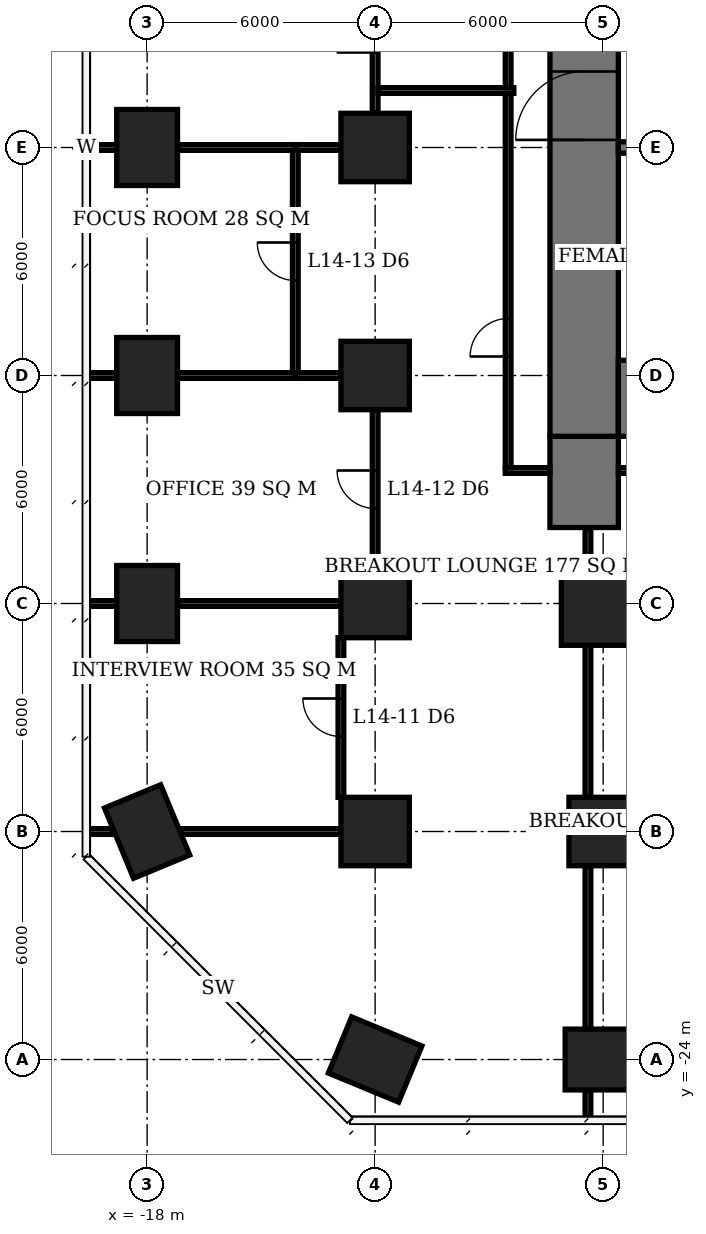
"""IFC4 building model, lengths in metres.
Left out: names, types, materials, properties, quantities, classifications, styles, units other than length and angle.
Written with IfcOpenShell. Run it as: python <this file> out.ifc"""

import sys

from ifc_helpers import new_model, si_unit, direction, frame, frame_2d, origin, origin_2d, place, context, subcontext, project, spatial, rectangle, extrude, element, fill, save


model = new_model("IFC4")
c1 = context("Model", 3, precision=1e-05, world=origin(), true_north=direction((0.0, 1.0)))
c2 = subcontext(c1, "Body", "Model", "MODEL_VIEW")
j1 = project(units=[si_unit("LENGTHUNIT", "METRE"), si_unit("PLANEANGLEUNIT", "RADIAN")], contexts=[c1])
p1 = place(None, origin())
s1 = spatial("IfcSite", under=j1, at=p1, CompositionType="ELEMENT")
p2 = place(p1, origin())
s2 = spatial("IfcBuilding", under=s1, at=p2, CompositionType="ELEMENT")
p3 = place(p2, frame((0.0, 0.0, 61.1)))
s3 = spatial("IfcBuildingStorey", under=s2, at=p3, CompositionType="ELEMENT", Elevation=61.1)
for number, where, z_axis, x_axis in (
    (1, (-18.0, -18.0, 0.0), (0.0, 0.0, 1.0), (-0.383, 0.924, 0.0)),
    (2, (-18.0, -12.0, 0.0), (0.0, 0.0, 1.0), (0.0, 1.0, 0.0)),
    (3, (-18.0, -6.0, 0.0), (0.0, 0.0, 1.0), (0.0, 1.0, 0.0)),
    (4, (-18.0, 0.0, 0.0), (0.0, 0.0, 1.0), (0.0, 1.0, 0.0)),
    (5, (-12.0, -24.0, 0.0), (0.0, 0.0, 1.0), (-0.924, 0.383, 0.0)),
):
    element("IfcColumn", number, at=place(p3, frame(where, z_axis=z_axis, x_axis=x_axis)), inside=s3, PredefinedType="COLUMN", context=c2, shape_type="SweptSolid", body=[
        extrude(rectangle(XDim=2.0, YDim=1.6, at=origin_2d()), origin(), (0.0, 0.0, 1.0), 3.9),
    ])
for number, where, z_axis, x_axis in (
    (6, (-12.0, -18.0, 0.0), (0.0, 0.0, 1.0), (1.0, 0.0, 0.0)),
    (7, (-12.0, -12.0, 0.0), (0.0, 0.0, 1.0), (1.0, 0.0, 0.0)),
    (8, (-12.0, -6.0, 0.0), (0.0, 0.0, 1.0), (1.0, 0.0, 0.0)),
    (9, (-12.0, 0.0, 0.0), (0.0, 0.0, 1.0), (1.0, 0.0, 0.0)),
):
    element("IfcColumn", number, at=place(p3, frame(where, z_axis=z_axis, x_axis=x_axis)), inside=s3, PredefinedType="COLUMN", context=c2, shape_type="SweptSolid", body=[
        extrude(rectangle(XDim=1.8, YDim=1.8, at=origin_2d()), origin(), (0.0, 0.0, 1.0), 3.9),
    ])
p4 = place(p3, frame((-6.0, -24.0, 0.0), z_axis=(0.0, 0.0, 1.0), x_axis=(1.0, 0.0, 0.0)))
e10 = element("IfcColumn", 10, at=p4, inside=s3, PredefinedType="COLUMN", context=c2, shape_type="SweptSolid", body=[
    extrude(rectangle(XDim=2.0, YDim=1.6, at=origin_2d()), origin(), (0.0, 0.0, 1.0), 3.9),
])
p5 = place(p3, frame((-6.0, -18.0, 0.0), z_axis=(0.0, 0.0, 1.0), x_axis=(1.0, 0.0, 0.0)))
e11 = element("IfcColumn", 11, at=p5, inside=s3, PredefinedType="COLUMN", context=c2, shape_type="SweptSolid", body=[
    extrude(rectangle(XDim=1.8, YDim=1.8, at=origin_2d()), origin(), (0.0, 0.0, 1.0), 3.9),
])
p6 = place(p3, frame((-6.0, -12.0, 0.0), z_axis=(0.0, 0.0, 1.0), x_axis=(1.0, 0.0, 0.0)))
e12 = element("IfcColumn", 12, at=p6, inside=s3, PredefinedType="COLUMN", context=c2, shape_type="SweptSolid", body=[
    extrude(rectangle(XDim=2.2, YDim=2.2, at=origin_2d()), origin(), (0.0, 0.0, 1.0), 3.9),
])
p7 = place(p3, frame((-5.6, -6.6, 0.0), z_axis=(0.0, 0.0, 1.0), x_axis=(1.0, 0.0, 0.0)))
e13 = element("IfcWall", 13, at=p7, inside=s3, PredefinedType="SHEAR", context=c2, shape_type="SweptSolid", body=[
    extrude(rectangle(XDim=23.2, YDim=2.0, at=frame_2d((11.6, 0.0))), origin(), (0.0, 0.0, 1.0), 3.9),
])
p8 = place(p3, frame((-6.5, -7.6, 0.0), z_axis=(0.0, 0.0, 1.0), x_axis=(0.0, 1.0, 0.0)))
e14 = element("IfcWall", 14, at=p8, inside=s3, PredefinedType="SHEAR", context=c2, shape_type="SweptSolid", body=[
    extrude(rectangle(XDim=21.2, YDim=1.8, at=frame_2d((10.6, 0.0))), origin(), (0.0, 0.0, 1.0), 3.9),
])
p9 = place(p8, frame((7.8, 0.0, 0.0)))
e15 = element("IfcOpeningElement", 15, at=p9, cuts=e14, PredefinedType="OPENING", context=c2, shape_type="SweptSolid", body=[
    extrude(rectangle(XDim=1.8, YDim=2.4, at=frame_2d((0.9, 1.2))), frame((0.0, 0.91, 0.0), z_axis=(0.0, -1.0, 0.0), x_axis=(1.0, 0.0, 0.0)), (0.0, 0.0, 1.0), 1.82),
])
p10 = place(p3, frame((-6.5, -10.0, 0.0), z_axis=(0.0, 0.0, 1.0), x_axis=(0.0, 1.0, 0.0)))
e16 = element("IfcWall", 16, at=p10, inside=s3, PredefinedType="SHEAR", context=c2, shape_type="SweptSolid", body=[
    extrude(rectangle(XDim=2.4, YDim=1.8, at=frame_2d((1.2, 0.0))), origin(), (0.0, 0.0, 1.0), 3.9),
])
p11 = place(p3, frame((-5.6, 0.0, 0.0), z_axis=(0.0, 0.0, 1.0), x_axis=(1.0, 0.0, 0.0)))
e17 = element("IfcWall", 17, at=p11, inside=s3, PredefinedType="SHEAR", context=c2, shape_type="SweptSolid", body=[
    extrude(rectangle(XDim=17.75, YDim=0.3, at=frame_2d((8.875, 0.0))), origin(), (0.0, 0.0, 1.0), 3.9),
])
p12 = place(p11, frame((0.6, 0.0, 0.0)))
e18 = element("IfcOpeningElement", 18, at=p12, cuts=e17, PredefinedType="OPENING", context=c2, shape_type="SweptSolid", body=[
    extrude(rectangle(XDim=0.9, YDim=2.1, at=frame_2d((0.45, 1.05))), frame((0.0, 0.16, 0.0), z_axis=(0.0, -1.0, 0.0), x_axis=(1.0, 0.0, 0.0)), (0.0, 0.0, 1.0), 0.32),
])
p13 = place(p11, frame((3.7, 0.0, 0.0)))
e19 = element("IfcOpeningElement", 19, at=p13, cuts=e17, PredefinedType="OPENING", context=c2, shape_type="SweptSolid", body=[
    extrude(rectangle(XDim=1.0, YDim=2.1, at=frame_2d((0.5, 1.05))), frame((0.0, 0.16, 0.0), z_axis=(0.0, -1.0, 0.0), x_axis=(1.0, 0.0, 0.0)), (0.0, 0.0, 1.0), 0.32),
])
p14 = place(p3, frame((-19.6, -18.0, 0.0), z_axis=(0.0, 0.0, 1.0), x_axis=(1.0, 0.0, 0.0)))
e20 = element("IfcWall", 20, at=p14, inside=s3, PredefinedType="PARTITIONING", context=c2, shape_type="SweptSolid", body=[
    extrude(rectangle(XDim=0.703, YDim=0.15, at=frame_2d((0.352, 0.0))), origin(), (0.0, 0.0, 1.0), 3.65),
])
p15 = place(p3, frame((-17.103, -18.0, 0.0), z_axis=(0.0, 0.0, 1.0), x_axis=(1.0, 0.0, 0.0)))
e21 = element("IfcWall", 21, at=p15, inside=s3, PredefinedType="PARTITIONING", context=c2, shape_type="SweptSolid", body=[
    extrude(rectangle(XDim=4.203, YDim=0.15, at=frame_2d((2.102, 0.0))), origin(), (0.0, 0.0, 1.0), 3.65),
])
p16 = place(p3, frame((-19.6, -12.0, 0.0), z_axis=(0.0, 0.0, 1.0), x_axis=(1.0, 0.0, 0.0)))
e22 = element("IfcWall", 22, at=p16, inside=s3, PredefinedType="PARTITIONING", context=c2, shape_type="SweptSolid", body=[
    extrude(rectangle(XDim=0.8, YDim=0.15, at=frame_2d((0.4, 0.0))), origin(), (0.0, 0.0, 1.0), 3.65),
])
p17 = place(p3, frame((-17.2, -12.0, 0.0), z_axis=(0.0, 0.0, 1.0), x_axis=(1.0, 0.0, 0.0)))
e23 = element("IfcWall", 23, at=p17, inside=s3, PredefinedType="PARTITIONING", context=c2, shape_type="SweptSolid", body=[
    extrude(rectangle(XDim=4.3, YDim=0.15, at=frame_2d((2.15, 0.0))), origin(), (0.0, 0.0, 1.0), 3.65),
])
p18 = place(p3, frame((-19.6, -6.0, 0.0), z_axis=(0.0, 0.0, 1.0), x_axis=(1.0, 0.0, 0.0)))
e24 = element("IfcWall", 24, at=p18, inside=s3, PredefinedType="PARTITIONING", context=c2, shape_type="SweptSolid", body=[
    extrude(rectangle(XDim=0.8, YDim=0.15, at=frame_2d((0.4, 0.0))), origin(), (0.0, 0.0, 1.0), 3.65),
])
p19 = place(p3, frame((-17.2, -6.0, 0.0), z_axis=(0.0, 0.0, 1.0), x_axis=(1.0, 0.0, 0.0)))
e25 = element("IfcWall", 25, at=p19, inside=s3, PredefinedType="PARTITIONING", context=c2, shape_type="SweptSolid", body=[
    extrude(rectangle(XDim=3.175, YDim=0.15, at=frame_2d((1.587, 0.0))), origin(), (0.0, 0.0, 1.0), 3.65),
])
p20 = place(p3, frame((-14.1, -6.0, 0.0), z_axis=(0.0, 0.0, 1.0), x_axis=(1.0, 0.0, 0.0)))
e26 = element("IfcWall", 26, at=p20, inside=s3, PredefinedType="PARTITIONING", context=c2, shape_type="SweptSolid", body=[
    extrude(rectangle(XDim=1.2, YDim=0.15, at=frame_2d((0.6, 0.0))), origin(), (0.0, 0.0, 1.0), 3.65),
])
p21 = place(p3, frame((-19.55, 0.0, 0.0), z_axis=(0.0, 0.0, 1.0), x_axis=(1.0, 0.0, 0.0)))
e27 = element("IfcWall", 27, at=p21, inside=s3, PredefinedType="PARTITIONING", context=c2, shape_type="SweptSolid", body=[
    extrude(rectangle(XDim=0.75, YDim=0.15, at=frame_2d((0.375, 0.0))), origin(), (0.0, 0.0, 1.0), 3.65),
])
p22 = place(p3, frame((-17.2, 0.0, 0.0), z_axis=(0.0, 0.0, 1.0), x_axis=(1.0, 0.0, 0.0)))
e28 = element("IfcWall", 28, at=p22, inside=s3, PredefinedType="PARTITIONING", context=c2, shape_type="SweptSolid", body=[
    extrude(rectangle(XDim=3.175, YDim=0.15, at=frame_2d((1.587, 0.0))), origin(), (0.0, 0.0, 1.0), 3.65),
])
p23 = place(p3, frame((-14.1, 0.0, 0.0), z_axis=(0.0, 0.0, 1.0), x_axis=(1.0, 0.0, 0.0)))
e29 = element("IfcWall", 29, at=p23, inside=s3, PredefinedType="PARTITIONING", context=c2, shape_type="SweptSolid", body=[
    extrude(rectangle(XDim=1.2, YDim=0.15, at=frame_2d((0.6, 0.0))), origin(), (0.0, 0.0, 1.0), 3.65),
])
p24 = place(p3, frame((-14.1, -5.925, 0.0), z_axis=(0.0, 0.0, 1.0), x_axis=(0.0, 1.0, 0.0)))
e30 = element("IfcWall", 30, at=p24, inside=s3, PredefinedType="PARTITIONING", context=c2, shape_type="SweptSolid", body=[
    extrude(rectangle(XDim=5.85, YDim=0.15, at=frame_2d((2.925, 0.0))), origin(), (0.0, 0.0, 1.0), 3.65),
])
p25 = place(p24, frame((2.425, 0.0, 0.0)))
e31 = element("IfcOpeningElement", 31, at=p25, cuts=e30, PredefinedType="OPENING", context=c2, shape_type="SweptSolid", body=[
    extrude(rectangle(XDim=1.0, YDim=2.1, at=frame_2d((0.5, 1.05))), frame((0.0, 0.085, 0.0), z_axis=(0.0, -1.0, 0.0), x_axis=(1.0, 0.0, 0.0)), (0.0, 0.0, 1.0), 0.17),
])
p26 = place(p3, frame((-12.9, -17.1, 0.0), z_axis=(0.0, 0.0, 1.0), x_axis=(0.0, 1.0, 0.0)))
e32 = element("IfcWall", 32, at=p26, inside=s3, PredefinedType="PARTITIONING", context=c2, shape_type="SweptSolid", body=[
    extrude(rectangle(XDim=4.2, YDim=0.15, at=frame_2d((2.1, 0.0))), origin(), (0.0, 0.0, 1.0), 3.65),
])
p27 = place(p26, frame((1.6, 0.0, 0.0)))
e33 = element("IfcOpeningElement", 33, at=p27, cuts=e32, PredefinedType="OPENING", context=c2, shape_type="SweptSolid", body=[
    extrude(rectangle(XDim=1.0, YDim=2.1, at=frame_2d((0.5, 1.05))), frame((0.0, 0.085, 0.0), z_axis=(0.0, -1.0, 0.0), x_axis=(1.0, 0.0, 0.0)), (0.0, 0.0, 1.0), 0.17),
])
p28 = place(p3, frame((-12.0, -11.1, 0.0), z_axis=(0.0, 0.0, 1.0), x_axis=(0.0, 1.0, 0.0)))
e34 = element("IfcWall", 34, at=p28, inside=s3, PredefinedType="PARTITIONING", context=c2, shape_type="SweptSolid", body=[
    extrude(rectangle(XDim=4.2, YDim=0.15, at=frame_2d((2.1, 0.0))), origin(), (0.0, 0.0, 1.0), 3.65),
])
p29 = place(p28, frame((1.6, 0.0, 0.0)))
e35 = element("IfcOpeningElement", 35, at=p29, cuts=e34, PredefinedType="OPENING", context=c2, shape_type="SweptSolid", body=[
    extrude(rectangle(XDim=1.0, YDim=2.1, at=frame_2d((0.5, 1.05))), frame((0.0, 0.085, 0.0), z_axis=(0.0, -1.0, 0.0), x_axis=(1.0, 0.0, 0.0)), (0.0, 0.0, 1.0), 0.17),
])
p30 = place(p3, frame((-12.0, 0.9, 0.0), z_axis=(0.0, 0.0, 1.0), x_axis=(0.0, 1.0, 0.0)))
e36 = element("IfcWall", 36, at=p30, inside=s3, PredefinedType="PARTITIONING", context=c2, shape_type="SweptSolid", body=[
    extrude(rectangle(XDim=4.2, YDim=0.15, at=frame_2d((2.1, 0.0))), origin(), (0.0, 0.0, 1.0), 3.65),
])
p31 = place(p30, frame((1.6, 0.0, 0.0)))
e37 = element("IfcOpeningElement", 37, at=p31, cuts=e36, PredefinedType="OPENING", context=c2, shape_type="SweptSolid", body=[
    extrude(rectangle(XDim=1.0, YDim=2.1, at=frame_2d((0.5, 1.05))), frame((0.0, 0.085, 0.0), z_axis=(0.0, -1.0, 0.0), x_axis=(1.0, 0.0, 0.0)), (0.0, 0.0, 1.0), 0.17),
])
p32 = place(p3, frame((-11.925, 1.5, 0.0), z_axis=(0.0, 0.0, 1.0), x_axis=(1.0, 0.0, 0.0)))
e38 = element("IfcWall", 38, at=p32, inside=s3, PredefinedType="PARTITIONING", context=c2, shape_type="SweptSolid", body=[
    extrude(rectangle(XDim=3.575, YDim=0.15, at=frame_2d((1.788, 0.0))), origin(), (0.0, 0.0, 1.0), 3.65),
])
p33 = place(p3, frame((-8.5, -8.425, 0.0), z_axis=(0.0, 0.0, 1.0), x_axis=(0.0, 1.0, 0.0)))
e39 = element("IfcWall", 39, at=p33, inside=s3, PredefinedType="PARTITIONING", context=c2, shape_type="SweptSolid", body=[
    extrude(rectangle(XDim=9.85, YDim=0.15, at=frame_2d((4.925, 0.0))), origin(), (0.0, 0.0, 1.0), 3.65),
])
p34 = place(p33, frame((2.925, 0.0, 0.0)))
e40 = element("IfcOpeningElement", 40, at=p34, cuts=e39, PredefinedType="OPENING", context=c2, shape_type="SweptSolid", body=[
    extrude(rectangle(XDim=1.0, YDim=2.1, at=frame_2d((0.5, 1.05))), frame((0.0, 0.085, 0.0), z_axis=(0.0, -1.0, 0.0), x_axis=(1.0, 0.0, 0.0)), (0.0, 0.0, 1.0), 0.17),
])
p35 = place(p3, frame((-8.575, -8.5, 0.0), z_axis=(0.0, 0.0, 1.0), x_axis=(1.0, 0.0, 0.0)))
e41 = element("IfcWall", 41, at=p35, inside=s3, PredefinedType="PARTITIONING", context=c2, shape_type="SweptSolid", body=[
    extrude(rectangle(XDim=1.175, YDim=0.15, at=frame_2d((0.587, 0.0))), origin(), (0.0, 0.0, 1.0), 3.65),
])
p36 = place(p3, frame((-8.5, 1.575, 0.0), z_axis=(0.0, 0.0, 1.0), x_axis=(0.0, 1.0, 0.0)))
e42 = element("IfcWall", 42, at=p36, inside=s3, PredefinedType="PARTITIONING", context=c2, shape_type="SweptSolid", body=[
    extrude(rectangle(XDim=12.85, YDim=0.15, at=frame_2d((6.425, 0.0))), origin(), (0.0, 0.0, 1.0), 3.65),
])
p37 = place(p36, frame((7.875, 0.0, 0.0)))
e43 = element("IfcOpeningElement", 43, at=p37, cuts=e42, PredefinedType="OPENING", context=c2, shape_type="SweptSolid", body=[
    extrude(rectangle(XDim=1.0, YDim=2.1, at=frame_2d((0.5, 1.05))), frame((0.0, 0.085, 0.0), z_axis=(0.0, -1.0, 0.0), x_axis=(1.0, 0.0, 0.0)), (0.0, 0.0, 1.0), 0.17),
])
p38 = place(p3, frame((-6.4, -25.55, 0.0), z_axis=(0.0, 0.0, 1.0), x_axis=(0.0, 1.0, 0.0)))
e44 = element("IfcWall", 44, at=p38, inside=s3, PredefinedType="PARTITIONING", context=c2, shape_type="SweptSolid", body=[
    extrude(rectangle(XDim=0.75, YDim=0.15, at=frame_2d((0.375, 0.0))), origin(), (0.0, 0.0, 1.0), 3.65),
])
p39 = place(p3, frame((-6.4, -23.2, 0.0), z_axis=(0.0, 0.0, 1.0), x_axis=(0.0, 1.0, 0.0)))
e45 = element("IfcWall", 45, at=p39, inside=s3, PredefinedType="PARTITIONING", context=c2, shape_type="SweptSolid", body=[
    extrude(rectangle(XDim=4.3, YDim=0.15, at=frame_2d((2.15, 0.0))), origin(), (0.0, 0.0, 1.0), 3.65),
])
p40 = place(p3, frame((-6.4, -17.1, 0.0), z_axis=(0.0, 0.0, 1.0), x_axis=(0.0, 1.0, 0.0)))
e46 = element("IfcWall", 46, at=p40, inside=s3, PredefinedType="PARTITIONING", context=c2, shape_type="SweptSolid", body=[
    extrude(rectangle(XDim=4.0, YDim=0.15, at=frame_2d((2.0, 0.0))), origin(), (0.0, 0.0, 1.0), 3.65),
])
p41 = place(p3, frame((-6.4, -10.9, 0.0), z_axis=(0.0, 0.0, 1.0), x_axis=(0.0, 1.0, 0.0)))
e47 = element("IfcWall", 47, at=p41, inside=s3, PredefinedType="PARTITIONING", context=c2, shape_type="SweptSolid", body=[
    extrude(rectangle(XDim=0.9, YDim=0.15, at=frame_2d((0.45, 0.0))), origin(), (0.0, 0.0, 1.0), 3.65),
])
p42 = place(p3, frame((-1.575, -8.5, 0.0), z_axis=(0.0, 0.0, 1.0), x_axis=(-1.0, 0.0, 0.0)))
e48 = element("IfcWall", 48, at=p42, inside=s3, PredefinedType="PARTITIONING", context=c2, shape_type="SweptSolid", body=[
    extrude(rectangle(XDim=4.025, YDim=0.15, at=frame_2d((2.013, 0.0))), origin(), (0.0, 0.0, 1.0), 3.65),
])
p43 = place(p42, frame((2.09, 0.0, 0.0)))
e49 = element("IfcOpeningElement", 49, at=p43, cuts=e48, PredefinedType="OPENING", context=c2, shape_type="SweptSolid", body=[
    extrude(rectangle(XDim=1.0, YDim=2.1, at=frame_2d((0.5, 1.05))), frame((0.0, 0.085, 0.0), z_axis=(0.0, -1.0, 0.0), x_axis=(1.0, 0.0, 0.0)), (0.0, 0.0, 1.0), 0.17),
])
p44 = place(p9, origin())
e50 = element("IfcDoor", 50, at=p44, inside=s3, OperationType="DOUBLE_DOOR_SINGLE_SWING", PredefinedType="DOOR", context=c2, shape_type="SweptSolid", body=[
    extrude(rectangle(XDim=1.8, YDim=2.4, at=frame_2d((0.9, 1.2))), frame((0.0, 0.025, 0.0), z_axis=(0.0, -1.0, 0.0), x_axis=(1.0, 0.0, 0.0)), (0.0, 0.0, 1.0), 0.05),
])
fill(e15, e50)
p45 = place(p27, origin())
e51 = element("IfcDoor", 51, at=p45, inside=s3, OperationType="SINGLE_SWING_RIGHT", PredefinedType="DOOR", context=c2, shape_type="SweptSolid", body=[
    extrude(rectangle(XDim=1.0, YDim=2.1, at=frame_2d((0.5, 1.05))), frame((0.0, 0.025, 0.0), z_axis=(0.0, -1.0, 0.0), x_axis=(1.0, 0.0, 0.0)), (0.0, 0.0, 1.0), 0.05),
])
fill(e33, e51)
p46 = place(p29, origin())
e52 = element("IfcDoor", 52, at=p46, inside=s3, OperationType="SINGLE_SWING_RIGHT", PredefinedType="DOOR", context=c2, shape_type="SweptSolid", body=[
    extrude(rectangle(XDim=1.0, YDim=2.1, at=frame_2d((0.5, 1.05))), frame((0.0, 0.025, 0.0), z_axis=(0.0, -1.0, 0.0), x_axis=(1.0, 0.0, 0.0)), (0.0, 0.0, 1.0), 0.05),
])
fill(e35, e52)
p47 = place(p25, origin())
e53 = element("IfcDoor", 53, at=p47, inside=s3, OperationType="SINGLE_SWING_RIGHT", PredefinedType="DOOR", context=c2, shape_type="SweptSolid", body=[
    extrude(rectangle(XDim=1.0, YDim=2.1, at=frame_2d((0.5, 1.05))), frame((0.0, 0.025, 0.0), z_axis=(0.0, -1.0, 0.0), x_axis=(1.0, 0.0, 0.0)), (0.0, 0.0, 1.0), 0.05),
])
fill(e31, e53)
p48 = place(p34, origin())
e54 = element("IfcDoor", 54, at=p48, inside=s3, OperationType="SINGLE_SWING_LEFT", PredefinedType="DOOR", context=c2, shape_type="SweptSolid", body=[
    extrude(rectangle(XDim=1.0, YDim=2.1, at=frame_2d((0.5, 1.05))), frame((0.0, 0.025, 0.0), z_axis=(0.0, -1.0, 0.0), x_axis=(1.0, 0.0, 0.0)), (0.0, 0.0, 1.0), 0.05),
])
fill(e40, e54)
save(model, sys.argv[1])
